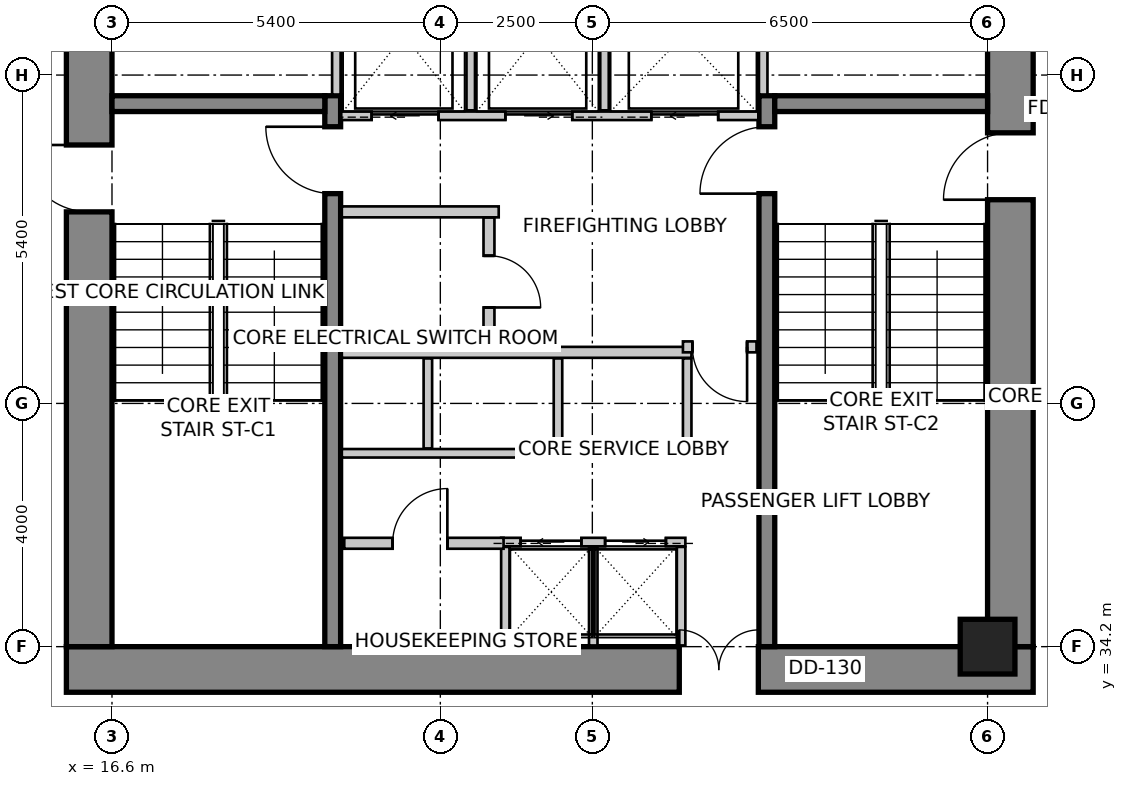
"""IFC4 building model, lengths in metres.
Left out: names, types, materials, properties, quantities, classifications, styles, units other than length and angle.
Written with IfcOpenShell. Run it as: python <this file> out.ifc"""

import sys

from ifc_helpers import new_model, si_unit, direction, frame, frame_2d, origin, origin_2d, place, context, subcontext, project, spatial, rectangle, extrude, source, transform, mapped, element, fill, save


model = new_model("IFC4")
c1 = context("Model", 3, precision=1e-05, world=origin(), true_north=direction((0.0, 1.0)))
c2 = subcontext(c1, "Body", "Model", "MODEL_VIEW")
j1 = project(units=[si_unit("LENGTHUNIT", "METRE"), si_unit("PLANEANGLEUNIT", "RADIAN")], contexts=[c1])
p1 = place(None, origin())
s1 = spatial("IfcSite", under=j1, at=p1, CompositionType="ELEMENT")
p2 = place(p1, origin())
s2 = spatial("IfcBuilding", under=s1, at=p2, CompositionType="ELEMENT")
p3 = place(p2, frame((0.0, 0.0, 139.4)))
s3 = spatial("IfcBuildingStorey", under=s2, at=p3, CompositionType="ELEMENT", Elevation=139.4)
p4 = place(p3, frame((15.85, 33.825, 0.0), z_axis=(0.0, 0.0, 1.0), x_axis=(1.0, 0.0, 0.0)))
e1 = element("IfcWall", 1, at=p4, inside=s3, PredefinedType="SHEAR", context=c2, shape_type="SweptSolid", body=[
    extrude(rectangle(XDim=15.9, YDim=0.75, at=frame_2d((7.95, 0.0))), origin(), (0.0, 0.0, 1.0), 3.6),
])
m1 = source(origin(), c2, "Body", "SweptSolid", [
    extrude(rectangle(XDim=1.3, YDim=2.15, at=frame_2d((0.65, 1.075))), frame((0.0, 0.385, 0.0), z_axis=(0.0, -1.0, 0.0), x_axis=(1.0, 0.0, 0.0)), (0.0, 0.0, 1.0), 0.77),
])
p5 = place(p4, frame((10.08, 0.0, 0.0)))
e2 = element("IfcOpeningElement", 2, at=p5, cuts=e1, PredefinedType="OPENING", context=c2, shape_type="MappedRepresentation", body=[
    mapped(m1, transform((0.0, 0.0, 0.0), scale=1.0)),
])
p6 = place(p3, frame((16.225, 34.2, 0.0), z_axis=(0.0, 0.0, 1.0), x_axis=(0.0, 1.0, 0.0)))
e3 = element("IfcWall", 3, at=p6, inside=s3, PredefinedType="SHEAR", context=c2, shape_type="SweptSolid", body=[
    extrude(rectangle(XDim=11.4, YDim=0.75, at=frame_2d((5.7, 0.0))), origin(), (0.0, 0.0, 1.0), 3.6),
])
m2 = source(origin(), c2, "Body", "SweptSolid", [
    extrude(rectangle(XDim=1.1, YDim=2.15, at=frame_2d((0.55, 1.075))), frame((0.0, 0.385, 0.0), z_axis=(0.0, -1.0, 0.0), x_axis=(1.0, 0.0, 0.0)), (0.0, 0.0, 1.0), 0.77),
])
p7 = place(p6, frame((7.15, 0.0, 0.0)))
e4 = element("IfcOpeningElement", 4, at=p7, cuts=e3, PredefinedType="OPENING", context=c2, shape_type="MappedRepresentation", body=[
    mapped(m2, transform((0.0, 0.0, 0.0), scale=1.0)),
])
p8 = place(p3, frame((31.375, 34.2, 0.0), z_axis=(0.0, 0.0, 1.0), x_axis=(0.0, 1.0, 0.0)))
e5 = element("IfcWall", 5, at=p8, inside=s3, PredefinedType="SHEAR", context=c2, shape_type="SweptSolid", body=[
    extrude(rectangle(XDim=11.4, YDim=0.75, at=frame_2d((5.7, 0.0))), origin(), (0.0, 0.0, 1.0), 3.6),
])
p9 = place(p8, frame((7.35, 0.0, 0.0)))
e6 = element("IfcOpeningElement", 6, at=p9, cuts=e5, PredefinedType="OPENING", context=c2, shape_type="MappedRepresentation", body=[
    mapped(m2, transform((0.0, 0.0, 0.0), scale=1.0)),
])
p10 = place(p3, frame((20.23, 34.2, 0.0), z_axis=(0.0, 0.0, 1.0), x_axis=(0.0, 1.0, 0.0)))
e7 = element("IfcWall", 7, at=p10, inside=s3, PredefinedType="SHEAR", context=c2, shape_type="SweptSolid", body=[
    extrude(rectangle(XDim=9.06, YDim=0.26, at=frame_2d((4.53, 0.0))), origin(), (0.0, 0.0, 1.0), 3.6),
])
m3 = source(origin(), c2, "Body", "SweptSolid", [
    extrude(rectangle(XDim=1.1, YDim=2.15, at=frame_2d((0.55, 1.075))), frame((0.0, 0.14, 0.0), z_axis=(0.0, -1.0, 0.0), x_axis=(1.0, 0.0, 0.0)), (0.0, 0.0, 1.0), 0.28),
])
p11 = place(p10, frame((7.45, 0.0, 0.0)))
e8 = element("IfcOpeningElement", 8, at=p11, cuts=e7, PredefinedType="OPENING", context=c2, shape_type="MappedRepresentation", body=[
    mapped(m3, transform((0.0, 0.0, 0.0), scale=1.0)),
])
p12 = place(p3, frame((27.37, 34.2, 0.0), z_axis=(0.0, 0.0, 1.0), x_axis=(0.0, 1.0, 0.0)))
e9 = element("IfcWall", 9, at=p12, inside=s3, PredefinedType="SHEAR", context=c2, shape_type="SweptSolid", body=[
    extrude(rectangle(XDim=9.06, YDim=0.26, at=frame_2d((4.53, 0.0))), origin(), (0.0, 0.0, 1.0), 3.6),
])
p13 = place(p12, frame((7.45, 0.0, 0.0)))
e10 = element("IfcOpeningElement", 10, at=p13, cuts=e9, PredefinedType="OPENING", context=c2, shape_type="MappedRepresentation", body=[
    mapped(m3, transform((0.0, 0.0, 0.0), scale=1.0)),
])
for number, where, z_axis, x_axis in (
    (11, (16.6, 43.13, 0.0), (0.0, 0.0, 1.0), (1.0, 0.0, 0.0)),
    (12, (27.5, 43.13, 0.0), (0.0, 0.0, 1.0), (1.0, 0.0, 0.0)),
):
    element("IfcWall", number, at=place(p3, frame(where, z_axis=z_axis, x_axis=x_axis)), inside=s3, PredefinedType="SHEAR", context=c2, shape_type="SweptSolid", body=[
        extrude(rectangle(XDim=3.5, YDim=0.26, at=frame_2d((1.75, 0.0))), origin(), (0.0, 0.0, 1.0), 3.6),
    ])
m4 = source(origin(), c2, "Body", "SweptSolid", [
    extrude(rectangle(XDim=0.9, YDim=0.9, at=origin_2d()), origin(), (0.0, 0.0, 1.0), 3.6),
])
p14 = place(p3, frame((31.0, 34.2, 0.0), z_axis=(0.0, 0.0, 1.0), x_axis=(1.0, 0.0, 0.0)))
e13 = element("IfcColumn", 13, at=p14, inside=s3, PredefinedType="COLUMN", context=c2, shape_type="MappedRepresentation", body=[
    mapped(m4, transform((0.0, 0.0, 0.0), scale=1.0)),
])
p15 = place(p3, frame((20.37, 42.93, 0.0), z_axis=(0.0, 0.0, 1.0), x_axis=(1.0, 0.0, 0.0)))
e14 = element("IfcWall", 14, at=p15, inside=s3, PredefinedType="SOLIDWALL", context=c2, shape_type="SweptSolid", body=[
    extrude(rectangle(XDim=6.86, YDim=0.14, at=frame_2d((3.43, 0.0))), origin(), (0.0, 0.0, 1.0), 3.35),
])
m5 = source(origin(), c2, "Body", "SweptSolid", [
    extrude(rectangle(XDim=1.1, YDim=2.15, at=frame_2d((0.55, 1.075))), frame((0.0, 0.08, 0.0), z_axis=(0.0, -1.0, 0.0), x_axis=(1.0, 0.0, 0.0)), (0.0, 0.0, 1.0), 0.16),
])
p16 = place(p15, frame((0.5, 0.0, 0.0)))
e15 = element("IfcOpeningElement", 15, at=p16, cuts=e14, PredefinedType="OPENING", context=c2, shape_type="MappedRepresentation", body=[
    mapped(m5, transform((0.0, 0.0, 0.0), scale=1.0)),
])
p17 = place(p15, frame((2.7, 0.0, 0.0)))
e16 = element("IfcOpeningElement", 16, at=p17, cuts=e14, PredefinedType="OPENING", context=c2, shape_type="MappedRepresentation", body=[
    mapped(m5, transform((0.0, 0.0, 0.0), scale=1.0)),
])
p18 = place(p15, frame((5.1, 0.0, 0.0)))
e17 = element("IfcOpeningElement", 17, at=p18, cuts=e14, PredefinedType="OPENING", context=c2, shape_type="MappedRepresentation", body=[
    mapped(m5, transform((0.0, 0.0, 0.0), scale=1.0)),
])
for number, where, z_axis, x_axis in (
    (18, (20.29, 43.28, 0.0), (0.0, 0.0, 1.0), (0.0, 1.0, 0.0)),
    (19, (27.31, 43.28, 0.0), (0.0, 0.0, 1.0), (0.0, 1.0, 0.0)),
):
    element("IfcWall", number, at=place(p3, frame(where, z_axis=z_axis, x_axis=x_axis)), inside=s3, PredefinedType="SOLIDWALL", context=c2, shape_type="SweptSolid", body=[
        extrude(rectangle(XDim=2.3, YDim=0.14, at=frame_2d((1.15, 0.0))), origin(), (0.0, 0.0, 1.0), 3.35),
    ])
for number, where, z_axis, x_axis in (
    (20, (22.5, 43.02, 0.0), (0.0, 0.0, 1.0), (0.0, 1.0, 0.0)),
    (21, (24.7, 43.02, 0.0), (0.0, 0.0, 1.0), (0.0, 1.0, 0.0)),
):
    element("IfcWall", number, at=place(p3, frame(where, z_axis=z_axis, x_axis=x_axis)), inside=s3, PredefinedType="SOLIDWALL", context=c2, shape_type="SweptSolid", body=[
        extrude(rectangle(XDim=2.56, YDim=0.14, at=frame_2d((1.28, 0.0))), origin(), (0.0, 0.0, 1.0), 3.35),
    ])
p19 = place(p3, frame((23.0, 35.92, 0.0), z_axis=(0.0, 0.0, 1.0), x_axis=(1.0, 0.0, 0.0)))
e22 = element("IfcWall", 22, at=p19, inside=s3, PredefinedType="SOLIDWALL", context=c2, shape_type="SweptSolid", body=[
    extrude(rectangle(XDim=3.03, YDim=0.14, at=frame_2d((1.515, 0.0))), origin(), (0.0, 0.0, 1.0), 3.35),
])
m6 = source(origin(), c2, "Body", "SweptSolid", [
    extrude(rectangle(XDim=1.0, YDim=2.15, at=frame_2d((0.5, 1.075))), frame((0.0, 0.08, 0.0), z_axis=(0.0, -1.0, 0.0), x_axis=(1.0, 0.0, 0.0)), (0.0, 0.0, 1.0), 0.16),
])
p20 = place(p19, frame((0.32, 0.0, 0.0)))
e23 = element("IfcOpeningElement", 23, at=p20, cuts=e22, PredefinedType="OPENING", context=c2, shape_type="MappedRepresentation", body=[
    mapped(m6, transform((0.0, 0.0, 0.0), scale=1.0)),
])
p21 = place(p19, frame((1.71, 0.0, 0.0)))
e24 = element("IfcOpeningElement", 24, at=p21, cuts=e22, PredefinedType="OPENING", context=c2, shape_type="MappedRepresentation", body=[
    mapped(m6, transform((0.0, 0.0, 0.0), scale=1.0)),
])
for number, where, z_axis, x_axis in (
    (25, (25.96, 34.22, 0.0), (0.0, 0.0, 1.0), (0.0, 1.0, 0.0)),
    (26, (23.07, 34.22, 0.0), (0.0, 0.0, 1.0), (0.0, 1.0, 0.0)),
    (27, (24.515, 34.22, 0.0), (0.0, 0.0, 1.0), (0.0, 1.0, 0.0)),
):
    element("IfcWall", number, at=place(p3, frame(where, z_axis=z_axis, x_axis=x_axis)), inside=s3, PredefinedType="SOLIDWALL", context=c2, shape_type="SweptSolid", body=[
        extrude(rectangle(XDim=1.62, YDim=0.14, at=frame_2d((0.81, 0.0))), origin(), (0.0, 0.0, 1.0), 2.642),
    ])
p22 = place(p3, frame((20.38, 37.38, 0.0), z_axis=(0.0, 0.0, 1.0), x_axis=(1.0, 0.0, 0.0)))
e28 = element("IfcWall", 28, at=p22, inside=s3, PredefinedType="SOLIDWALL", context=c2, shape_type="SweptSolid", body=[
    extrude(rectangle(XDim=5.75, YDim=0.14, at=frame_2d((2.875, 0.0))), origin(), (0.0, 0.0, 1.0), 3.35),
])
p23 = place(p3, frame((20.38, 39.04, 0.0), z_axis=(0.0, 0.0, 1.0), x_axis=(1.0, 0.0, 0.0)))
e29 = element("IfcWall", 29, at=p23, inside=s3, PredefinedType="SOLIDWALL", context=c2, shape_type="SweptSolid", body=[
    extrude(rectangle(XDim=5.75, YDim=0.18, at=frame_2d((2.875, 0.0))), origin(), (0.0, 0.0, 1.0), 3.35),
])
for number, where, z_axis, x_axis in (
    (30, (26.06, 37.46, 0.0), (0.0, 0.0, 1.0), (0.0, 1.0, 0.0)),
    (31, (21.795, 37.46, 0.0), (0.0, 0.0, 1.0), (0.0, 1.0, 0.0)),
    (32, (23.935, 37.46, 0.0), (0.0, 0.0, 1.0), (0.0, 1.0, 0.0)),
):
    element("IfcWall", number, at=place(p3, frame(where, z_axis=z_axis, x_axis=x_axis)), inside=s3, PredefinedType="SOLIDWALL", context=c2, shape_type="SweptSolid", body=[
        extrude(rectangle(XDim=1.48, YDim=0.14, at=frame_2d((0.74, 0.0))), origin(), (0.0, 0.0, 1.0), 3.35),
    ])
p24 = place(p3, frame((22.96, 41.35, 0.0), z_axis=(0.0, 0.0, 1.0), x_axis=(-1.0, 0.0, 0.0)))
e33 = element("IfcWall", 33, at=p24, inside=s3, PredefinedType="PARTITIONING", context=c2, shape_type="SweptSolid", body=[
    extrude(rectangle(XDim=2.58, YDim=0.18, at=frame_2d((1.29, 0.0))), origin(), (0.0, 0.0, 1.0), 3.35),
])
p25 = place(p3, frame((22.8, 41.256, 0.0), z_axis=(0.0, 0.0, 1.0), x_axis=(0.0, -1.0, 0.0)))
e34 = element("IfcWall", 34, at=p25, inside=s3, PredefinedType="PARTITIONING", context=c2, shape_type="SweptSolid", body=[
    extrude(rectangle(XDim=2.106, YDim=0.18, at=frame_2d((1.053, 0.0))), origin(), (0.0, 0.0, 1.0), 3.35),
])
m7 = source(origin(), c2, "Body", "SweptSolid", [
    extrude(rectangle(XDim=0.85, YDim=2.15, at=frame_2d((0.425, 1.075))), frame((0.0, 0.1, 0.0), z_axis=(0.0, -1.0, 0.0), x_axis=(1.0, 0.0, 0.0)), (0.0, 0.0, 1.0), 0.2),
])
p26 = place(p25, frame((0.628, 0.0, 0.0)))
e35 = element("IfcOpeningElement", 35, at=p26, cuts=e34, PredefinedType="OPENING", context=c2, shape_type="MappedRepresentation", body=[
    mapped(m7, transform((0.0, 0.0, 0.0), scale=1.0)),
])
p27 = place(p3, frame((27.2, 39.13, 0.0), z_axis=(0.0, 0.0, 1.0), x_axis=(-1.0, 0.0, 0.0)))
e36 = element("IfcWall", 36, at=p27, inside=s3, PredefinedType="PARTITIONING", context=c2, shape_type="SweptSolid", body=[
    extrude(rectangle(XDim=1.21, YDim=0.18, at=frame_2d((0.605, 0.0))), origin(), (0.0, 0.0, 1.0), 3.35),
])
m8 = source(origin(), c2, "Body", "SweptSolid", [
    extrude(rectangle(XDim=0.9, YDim=2.15, at=frame_2d((0.45, 1.075))), frame((0.0, 0.1, 0.0), z_axis=(0.0, -1.0, 0.0), x_axis=(1.0, 0.0, 0.0)), (0.0, 0.0, 1.0), 0.2),
])
p28 = place(p27, frame((0.155, 0.0, 0.0)))
e37 = element("IfcOpeningElement", 37, at=p28, cuts=e36, PredefinedType="OPENING", context=c2, shape_type="MappedRepresentation", body=[
    mapped(m8, transform((0.0, 0.0, 0.0), scale=1.0)),
])
p29 = place(p3, frame((20.42, 35.9, 0.0), z_axis=(0.0, 0.0, 1.0), x_axis=(1.0, 0.0, 0.0)))
e38 = element("IfcWall", 38, at=p29, inside=s3, PredefinedType="PARTITIONING", context=c2, shape_type="SweptSolid", body=[
    extrude(rectangle(XDim=2.62, YDim=0.18, at=frame_2d((1.31, 0.0))), origin(), (0.0, 0.0, 1.0), 3.35),
])
p30 = place(p29, frame((0.796, 0.0, 0.0)))
e39 = element("IfcOpeningElement", 39, at=p30, cuts=e38, PredefinedType="OPENING", context=c2, shape_type="MappedRepresentation", body=[
    mapped(m8, transform((0.0, 0.0, 0.0), scale=1.0)),
])
m9 = source(origin(), c2, "Body", "SweptSolid", [
    extrude(rectangle(XDim=1.1, YDim=2.15, at=frame_2d((0.55, 1.075))), frame((0.0, 0.025, 0.0), z_axis=(0.0, -1.0, 0.0), x_axis=(1.0, 0.0, 0.0)), (0.0, 0.0, 1.0), 0.05),
])
p31 = place(p16, origin())
e40 = element("IfcDoor", 40, at=p31, inside=s3, OperationType="SLIDING_TO_LEFT", PredefinedType="DOOR", context=c2, shape_type="MappedRepresentation", body=[
    mapped(m9, transform((0.0, 0.0, 0.0), scale=1.0)),
])
fill(e15, e40)
p32 = place(p17, origin())
e41 = element("IfcDoor", 41, at=p32, inside=s3, OperationType="SLIDING_TO_RIGHT", PredefinedType="DOOR", context=c2, shape_type="MappedRepresentation", body=[
    mapped(m9, transform((0.0, 0.0, 0.0), scale=1.0)),
])
fill(e16, e41)
m10 = source(origin(), c2, "Body", "SweptSolid", [
    extrude(rectangle(XDim=1.1, YDim=2.15, at=frame_2d((0.55, 1.075))), frame((0.0, 0.025, 0.0), z_axis=(0.0, -1.0, 0.0), x_axis=(1.0, 0.0, 0.0)), (0.0, 0.0, 1.0), 0.05),
])
p33 = place(p18, origin())
e42 = element("IfcDoor", 42, at=p33, inside=s3, OperationType="SLIDING_TO_LEFT", PredefinedType="DOOR", context=c2, shape_type="MappedRepresentation", body=[
    mapped(m10, transform((0.0, 0.0, 0.0), scale=1.0)),
])
fill(e17, e42)
m11 = source(origin(), c2, "Body", "SweptSolid", [
    extrude(rectangle(XDim=1.0, YDim=2.15, at=frame_2d((0.5, 1.075))), frame((0.0, 0.025, 0.0), z_axis=(0.0, -1.0, 0.0), x_axis=(1.0, 0.0, 0.0)), (0.0, 0.0, 1.0), 0.05),
])
p34 = place(p20, origin())
e43 = element("IfcDoor", 43, at=p34, inside=s3, OperationType="SLIDING_TO_LEFT", PredefinedType="DOOR", context=c2, shape_type="MappedRepresentation", body=[
    mapped(m11, transform((0.0, 0.0, 0.0), scale=1.0)),
])
fill(e23, e43)
p35 = place(p21, origin())
e44 = element("IfcDoor", 44, at=p35, inside=s3, OperationType="SLIDING_TO_RIGHT", PredefinedType="DOOR", context=c2, shape_type="MappedRepresentation", body=[
    mapped(m11, transform((0.0, 0.0, 0.0), scale=1.0)),
])
fill(e24, e44)
m12 = source(origin(), c2, "Body", "SweptSolid", [
    extrude(rectangle(XDim=1.1, YDim=2.15, at=frame_2d((0.55, 1.075))), frame((0.0, 0.025, 0.0), z_axis=(0.0, -1.0, 0.0), x_axis=(1.0, 0.0, 0.0)), (0.0, 0.0, 1.0), 0.05),
])
p36 = place(p11, origin())
e45 = element("IfcDoor", 45, at=p36, inside=s3, OperationType="SINGLE_SWING_RIGHT", PredefinedType="DOOR", context=c2, shape_type="MappedRepresentation", body=[
    mapped(m12, transform((0.0, 0.0, 0.0), scale=1.0)),
])
fill(e8, e45)
p37 = place(p13, origin())
e46 = element("IfcDoor", 46, at=p37, inside=s3, OperationType="SINGLE_SWING_LEFT", PredefinedType="DOOR", context=c2, shape_type="MappedRepresentation", body=[
    mapped(m12, transform((0.0, 0.0, 0.0), scale=1.0)),
])
fill(e10, e46)
p38 = place(p7, origin())
e47 = element("IfcDoor", 47, at=p38, inside=s3, OperationType="SINGLE_SWING_RIGHT", PredefinedType="DOOR", context=c2, shape_type="MappedRepresentation", body=[
    mapped(m12, transform((0.0, 0.0, 0.0), scale=1.0)),
])
fill(e4, e47)
p39 = place(p9, origin())
e48 = element("IfcDoor", 48, at=p39, inside=s3, OperationType="SINGLE_SWING_LEFT", PredefinedType="DOOR", context=c2, shape_type="MappedRepresentation", body=[
    mapped(m12, transform((0.0, 0.0, 0.0), scale=1.0)),
])
fill(e6, e48)
m13 = source(origin(), c2, "Body", "SweptSolid", [
    extrude(rectangle(XDim=1.3, YDim=2.15, at=frame_2d((0.65, 1.075))), frame((0.0, 0.025, 0.0), z_axis=(0.0, -1.0, 0.0), x_axis=(1.0, 0.0, 0.0)), (0.0, 0.0, 1.0), 0.05),
])
p40 = place(p5, origin())
e49 = element("IfcDoor", 49, at=p40, inside=s3, OperationType="DOUBLE_DOOR_SINGLE_SWING", PredefinedType="DOOR", context=c2, shape_type="MappedRepresentation", body=[
    mapped(m13, transform((0.0, 0.0, 0.0), scale=1.0)),
])
fill(e2, e49)
m14 = source(origin(), c2, "Body", "SweptSolid", [
    extrude(rectangle(XDim=0.85, YDim=2.15, at=frame_2d((0.425, 1.075))), frame((0.0, 0.025, 0.0), z_axis=(0.0, -1.0, 0.0), x_axis=(1.0, 0.0, 0.0)), (0.0, 0.0, 1.0), 0.05),
])
p41 = place(p26, origin())
e50 = element("IfcDoor", 50, at=p41, inside=s3, OperationType="SINGLE_SWING_RIGHT", PredefinedType="DOOR", context=c2, shape_type="MappedRepresentation", body=[
    mapped(m14, transform((0.0, 0.0, 0.0), scale=1.0)),
])
fill(e35, e50)
m15 = source(origin(), c2, "Body", "SweptSolid", [
    extrude(rectangle(XDim=0.9, YDim=2.15, at=frame_2d((0.45, 1.075))), frame((0.0, 0.025, 0.0), z_axis=(0.0, -1.0, 0.0), x_axis=(1.0, 0.0, 0.0)), (0.0, 0.0, 1.0), 0.05),
])
p42 = place(p28, origin())
e51 = element("IfcDoor", 51, at=p42, inside=s3, OperationType="SINGLE_SWING_LEFT", PredefinedType="DOOR", context=c2, shape_type="MappedRepresentation", body=[
    mapped(m15, transform((0.0, 0.0, 0.0), scale=1.0)),
])
fill(e37, e51)
p43 = place(p30, origin())
e52 = element("IfcDoor", 52, at=p43, inside=s3, OperationType="SINGLE_SWING_RIGHT", PredefinedType="DOOR", context=c2, shape_type="MappedRepresentation", body=[
    mapped(m15, transform((0.0, 0.0, 0.0), scale=1.0)),
])
fill(e39, e52)
save(model, sys.argv[1])
